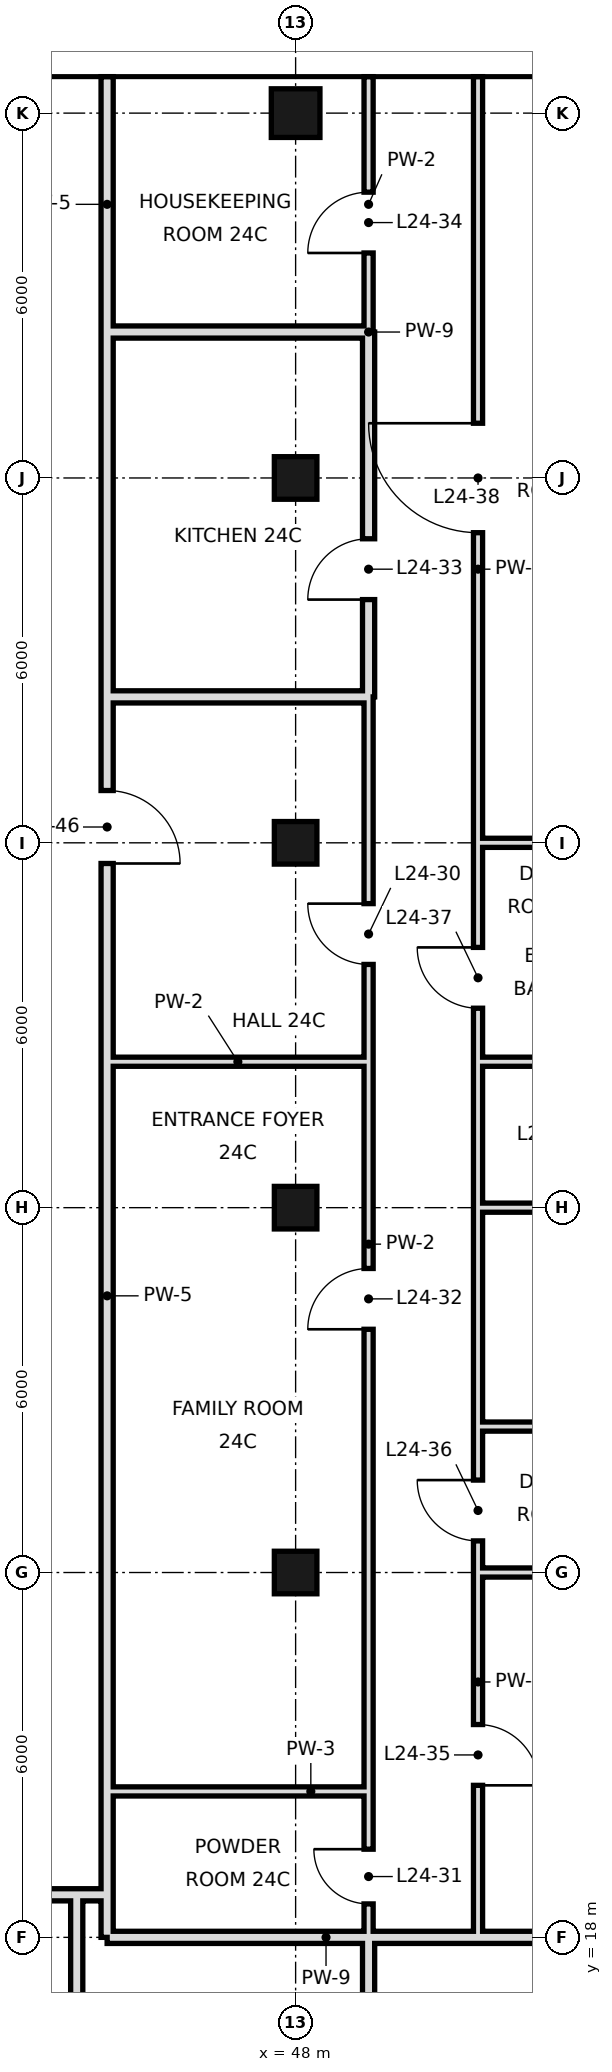
"""IFC4 building model, lengths in metres.
Left out: names, types, materials, properties, quantities, classifications, styles, units other than length and angle.
Written with IfcOpenShell. Run it as: python <this file> out.ifc"""

import sys

from ifc_helpers import new_model, si_unit, direction, frame, frame_2d, origin, origin_2d, place, context, subcontext, project, spatial, rectangle, hollow_rectangle, extrude, element, fill, save


model = new_model("IFC4")
c1 = context("Model", 3, precision=1e-05, world=origin(), true_north=direction((0.0, 1.0)))
c2 = subcontext(c1, "Body", "Model", "MODEL_VIEW")
j1 = project(units=[si_unit("LENGTHUNIT", "METRE"), si_unit("PLANEANGLEUNIT", "RADIAN")], contexts=[c1])
p1 = place(None, origin())
s1 = spatial("IfcSite", under=j1, at=p1, CompositionType="ELEMENT")
p2 = place(p1, origin())
s2 = spatial("IfcBuilding", under=s1, at=p2, CompositionType="ELEMENT")
p3 = place(p2, frame((0.0, 0.0, 110.6)))
s3 = spatial("IfcBuildingStorey", under=s2, at=p3, CompositionType="ELEMENT", Elevation=110.6)
for number, where, z_axis, x_axis in (
    (1, (48.0, 24.0, 0.0), (0.0, 0.0, 1.0), (1.0, 0.0, 0.0)),
    (2, (48.0, 30.0, 0.0), (0.0, 0.0, 1.0), (1.0, 0.0, 0.0)),
    (3, (48.0, 36.0, 0.0), (0.0, 0.0, 1.0), (1.0, 0.0, 0.0)),
    (4, (48.0, 42.0, 0.0), (0.0, 0.0, 1.0), (1.0, 0.0, 0.0)),
):
    element("IfcColumn", number, at=place(p3, frame(where, z_axis=z_axis, x_axis=x_axis)), inside=s3, PredefinedType="COLUMN", context=c2, shape_type="SweptSolid", body=[
        extrude(hollow_rectangle(XDim=0.7, YDim=0.7, WallThickness=0.036, at=origin_2d()), origin(), (0.0, 0.0, 1.0), 3.6),
    ])
p4 = place(p3, frame((48.0, 48.0, 0.0), z_axis=(0.0, 0.0, 1.0), x_axis=(1.0, 0.0, 0.0)))
e5 = element("IfcColumn", 5, at=p4, inside=s3, PredefinedType="COLUMN", context=c2, shape_type="SweptSolid", body=[
    extrude(hollow_rectangle(XDim=0.8, YDim=0.8, WallThickness=0.04, at=origin_2d()), origin(), (0.0, 0.0, 1.0), 3.6),
])
p5 = place(p3, frame((44.4, 10.8, 0.0), z_axis=(0.0, 0.0, 1.0), x_axis=(0.0, 1.0, 0.0)))
e6 = element("IfcWall", 6, at=p5, inside=s3, PredefinedType="SOLIDWALL", context=c2, shape_type="SweptSolid", body=[
    extrude(rectangle(XDim=7.9, YDim=0.2, at=frame_2d((3.95, 0.0))), origin(), (0.0, 0.0, 1.0), 2.68),
])
p6 = place(p3, frame((44.9, 18.7, 0.0), z_axis=(0.0, 0.0, 1.0), x_axis=(0.0, 1.0, 0.0)))
e7 = element("IfcWall", 7, at=p6, inside=s3, PredefinedType="SOLIDWALL", context=c2, shape_type="SweptSolid", body=[
    extrude(rectangle(XDim=19.7, YDim=0.2, at=frame_2d((9.85, 0.0))), origin(), (0.0, 0.0, 1.0), 2.93),
])
p7 = place(p6, frame((16.96, 0.0, 0.0)))
e8 = element("IfcOpeningElement", 8, at=p7, cuts=e7, PredefinedType="OPENING", context=c2, shape_type="SweptSolid", body=[
    extrude(rectangle(XDim=1.2, YDim=2.4, at=frame_2d((0.6, 1.2))), frame((0.0, 0.11, 0.0), z_axis=(0.0, -1.0, 0.0), x_axis=(1.0, 0.0, 0.0)), (0.0, 0.0, 1.0), 0.22),
])
p8 = place(p3, frame((44.9, 44.4, 0.0), z_axis=(0.0, 0.0, 1.0), x_axis=(0.0, 1.0, 0.0)))
e9 = element("IfcWall", 9, at=p8, inside=s3, PredefinedType="SOLIDWALL", context=c2, shape_type="SweptSolid", body=[
    extrude(rectangle(XDim=4.2, YDim=0.2, at=frame_2d((2.1, 0.0))), origin(), (0.0, 0.0, 1.0), 2.68),
])
p9 = place(p3, frame((44.9, 18.0, 0.0), z_axis=(0.0, 0.0, 1.0), x_axis=(0.0, 1.0, 0.0)))
e10 = element("IfcWall", 10, at=p9, inside=s3, PredefinedType="SOLIDWALL", context=c2, shape_type="SweptSolid", body=[
    extrude(rectangle(XDim=0.7, YDim=0.2, at=frame_2d((0.35, 0.0))), origin(), (0.0, 0.0, 1.0), 2.93),
])
p10 = place(p3, frame((44.9, 38.4, 0.0), z_axis=(0.0, 0.0, 1.0), x_axis=(0.0, 1.0, 0.0)))
e11 = element("IfcWall", 11, at=p10, inside=s3, PredefinedType="SOLIDWALL", context=c2, shape_type="SweptSolid", body=[
    extrude(rectangle(XDim=6.0, YDim=0.2, at=frame_2d((3.0, 0.0))), origin(), (0.0, 0.0, 1.0), 2.93),
])
p11 = place(p3, frame((49.2, 10.8, 0.0), z_axis=(0.0, 0.0, 1.0), x_axis=(0.0, 1.0, 0.0)))
e12 = element("IfcWall", 12, at=p11, inside=s3, PredefinedType="SOLIDWALL", context=c2, shape_type="SweptSolid", body=[
    extrude(rectangle(XDim=7.2, YDim=0.2, at=frame_2d((3.6, 0.0))), origin(), (0.0, 0.0, 1.0), 2.68),
])
p12 = place(p3, frame((49.2, 38.4, 0.0), z_axis=(0.0, 0.0, 1.0), x_axis=(0.0, 1.0, 0.0)))
e13 = element("IfcWall", 13, at=p12, inside=s3, PredefinedType="SOLIDWALL", context=c2, shape_type="SweptSolid", body=[
    extrude(rectangle(XDim=6.0, YDim=0.2, at=frame_2d((3.0, 0.0))), origin(), (0.0, 0.0, 1.0), 2.68),
])
p13 = place(p12, frame((1.6, 0.0, 0.0)))
e14 = element("IfcOpeningElement", 14, at=p13, cuts=e13, PredefinedType="OPENING", context=c2, shape_type="SweptSolid", body=[
    extrude(rectangle(XDim=1.0, YDim=2.4, at=frame_2d((0.5, 1.2))), frame((0.0, 0.11, 0.0), z_axis=(0.0, -1.0, 0.0), x_axis=(1.0, 0.0, 0.0)), (0.0, 0.0, 1.0), 0.22),
])
p14 = place(p3, frame((49.2, 20.4, 0.0), z_axis=(0.0, 0.0, 1.0), x_axis=(0.0, 1.0, 0.0)))
e15 = element("IfcWall", 15, at=p14, inside=s3, PredefinedType="PARTITIONING", context=c2, shape_type="SweptSolid", body=[
    extrude(rectangle(XDim=18.0, YDim=0.15, at=frame_2d((9.0, 0.0))), origin(), (0.0, 0.0, 1.0), 3.38),
])
p15 = place(p14, frame((13.6, 0.0, 0.0)))
e16 = element("IfcOpeningElement", 16, at=p15, cuts=e15, PredefinedType="OPENING", context=c2, shape_type="SweptSolid", body=[
    extrude(rectangle(XDim=1.0, YDim=2.4, at=frame_2d((0.5, 1.2))), frame((0.0, 0.085, 0.0), z_axis=(0.0, -1.0, 0.0), x_axis=(1.0, 0.0, 0.0)), (0.0, 0.0, 1.0), 0.17),
])
p16 = place(p14, frame((7.6, 0.0, 0.0)))
e17 = element("IfcOpeningElement", 17, at=p16, cuts=e15, PredefinedType="OPENING", context=c2, shape_type="SweptSolid", body=[
    extrude(rectangle(XDim=1.0, YDim=2.4, at=frame_2d((0.5, 1.2))), frame((0.0, 0.085, 0.0), z_axis=(0.0, -1.0, 0.0), x_axis=(1.0, 0.0, 0.0)), (0.0, 0.0, 1.0), 0.17),
])
p17 = place(p3, frame((49.2, 44.4, 0.0), z_axis=(0.0, 0.0, 1.0), x_axis=(0.0, 1.0, 0.0)))
e18 = element("IfcWall", 18, at=p17, inside=s3, PredefinedType="PARTITIONING", context=c2, shape_type="SweptSolid", body=[
    extrude(rectangle(XDim=4.2, YDim=0.15, at=frame_2d((2.1, 0.0))), origin(), (0.0, 0.0, 1.0), 3.38),
])
p18 = place(p17, frame((1.3, 0.0, 0.0)))
e19 = element("IfcOpeningElement", 19, at=p18, cuts=e18, PredefinedType="OPENING", context=c2, shape_type="SweptSolid", body=[
    extrude(rectangle(XDim=1.0, YDim=2.4, at=frame_2d((0.5, 1.2))), frame((0.0, 0.085, 0.0), z_axis=(0.0, -1.0, 0.0), x_axis=(1.0, 0.0, 0.0)), (0.0, 0.0, 1.0), 0.17),
])
p19 = place(p3, frame((49.2, 18.0, 0.0), z_axis=(0.0, 0.0, 1.0), x_axis=(0.0, 1.0, 0.0)))
e20 = element("IfcWall", 20, at=p19, inside=s3, PredefinedType="PARTITIONING", context=c2, shape_type="SweptSolid", body=[
    extrude(rectangle(XDim=2.4, YDim=0.15, at=frame_2d((1.2, 0.0))), origin(), (0.0, 0.0, 1.0), 3.38),
])
p20 = place(p19, frame((0.55, 0.0, 0.0)))
e21 = element("IfcOpeningElement", 21, at=p20, cuts=e20, PredefinedType="OPENING", context=c2, shape_type="SweptSolid", body=[
    extrude(rectangle(XDim=0.9, YDim=2.4, at=frame_2d((0.45, 1.2))), frame((0.0, 0.085, 0.0), z_axis=(0.0, -1.0, 0.0), x_axis=(1.0, 0.0, 0.0)), (0.0, 0.0, 1.0), 0.17),
])
p21 = place(p3, frame((51.0, 18.0, 0.0), z_axis=(0.0, 0.0, 1.0), x_axis=(0.0, 1.0, 0.0)))
e22 = element("IfcWall", 22, at=p21, inside=s3, PredefinedType="PARTITIONING", context=c2, shape_type="SweptSolid", body=[
    extrude(rectangle(XDim=8.4, YDim=0.15, at=frame_2d((4.2, 0.0))), origin(), (0.0, 0.0, 1.0), 3.38),
])
p22 = place(p21, frame((2.5, 0.0, 0.0)))
e23 = element("IfcOpeningElement", 23, at=p22, cuts=e22, PredefinedType="OPENING", context=c2, shape_type="SweptSolid", body=[
    extrude(rectangle(XDim=1.0, YDim=2.4, at=frame_2d((0.5, 1.2))), frame((0.0, 0.085, 0.0), z_axis=(0.0, -1.0, 0.0), x_axis=(1.0, 0.0, 0.0)), (0.0, 0.0, 1.0), 0.17),
])
p23 = place(p21, frame((6.52, 0.0, 0.0)))
e24 = element("IfcOpeningElement", 24, at=p23, cuts=e22, PredefinedType="OPENING", context=c2, shape_type="SweptSolid", body=[
    extrude(rectangle(XDim=1.0, YDim=2.4, at=frame_2d((0.5, 1.2))), frame((0.0, 0.085, 0.0), z_axis=(0.0, -1.0, 0.0), x_axis=(1.0, 0.0, 0.0)), (0.0, 0.0, 1.0), 0.17),
])
p24 = place(p3, frame((51.0, 32.4, 0.0), z_axis=(0.0, 0.0, 1.0), x_axis=(0.0, 1.0, 0.0)))
e25 = element("IfcWall", 25, at=p24, inside=s3, PredefinedType="PARTITIONING", context=c2, shape_type="SweptSolid", body=[
    extrude(rectangle(XDim=16.2, YDim=0.15, at=frame_2d((8.1, 0.0))), origin(), (0.0, 0.0, 1.0), 3.38),
])
p25 = place(p24, frame((0.88, 0.0, 0.0)))
e26 = element("IfcOpeningElement", 26, at=p25, cuts=e25, PredefinedType="OPENING", context=c2, shape_type="SweptSolid", body=[
    extrude(rectangle(XDim=1.0, YDim=2.4, at=frame_2d((0.5, 1.2))), frame((0.0, 0.085, 0.0), z_axis=(0.0, -1.0, 0.0), x_axis=(1.0, 0.0, 0.0)), (0.0, 0.0, 1.0), 0.17),
])
p26 = place(p24, frame((8.7, 0.0, 0.0)))
e27 = element("IfcOpeningElement", 27, at=p26, cuts=e25, PredefinedType="OPENING", context=c2, shape_type="SweptSolid", body=[
    extrude(rectangle(XDim=1.8, YDim=2.4, at=frame_2d((0.9, 1.2))), frame((0.0, 0.085, 0.0), z_axis=(0.0, -1.0, 0.0), x_axis=(1.0, 0.0, 0.0)), (0.0, 0.0, 1.0), 0.17),
])
p27 = place(p3, frame((51.0, 26.4, 0.0), z_axis=(0.0, 0.0, 1.0), x_axis=(0.0, 1.0, 0.0)))
e28 = element("IfcWall", 28, at=p27, inside=s3, PredefinedType="PARTITIONING", context=c2, shape_type="SweptSolid", body=[
    extrude(rectangle(XDim=6.0, YDim=0.15, at=frame_2d((3.0, 0.0))), origin(), (0.0, 0.0, 1.0), 3.38),
])
p28 = place(p3, frame((44.9, 18.0, 0.0), z_axis=(0.0, 0.0, 1.0), x_axis=(1.0, 0.0, 0.0)))
e29 = element("IfcWall", 29, at=p28, inside=s3, PredefinedType="SOLIDWALL", context=c2, shape_type="SweptSolid", body=[
    extrude(rectangle(XDim=4.3, YDim=0.2, at=frame_2d((2.15, 0.0))), origin(), (0.0, 0.0, 1.0), 2.68),
])
p29 = place(p3, frame((49.2, 18.0, 0.0), z_axis=(0.0, 0.0, 1.0), x_axis=(1.0, 0.0, 0.0)))
e30 = element("IfcWall", 30, at=p29, inside=s3, PredefinedType="SOLIDWALL", context=c2, shape_type="SweptSolid", body=[
    extrude(rectangle(XDim=11.4, YDim=0.2, at=frame_2d((5.7, 0.0))), origin(), (0.0, 0.0, 1.0), 2.68),
])
p30 = place(p3, frame((21.6, 18.7, 0.0), z_axis=(0.0, 0.0, 1.0), x_axis=(1.0, 0.0, 0.0)))
e31 = element("IfcWall", 31, at=p30, inside=s3, PredefinedType="SOLIDWALL", context=c2, shape_type="SweptSolid", body=[
    extrude(rectangle(XDim=22.8, YDim=0.2, at=frame_2d((11.4, 0.0))), origin(), (0.0, 0.0, 1.0), 2.68),
])
p31 = place(p30, frame((4.8, 0.0, 0.0)))
e32 = element("IfcOpeningElement", 32, at=p31, cuts=e31, PredefinedType="OPENING", context=c2, shape_type="SweptSolid", body=[
    extrude(rectangle(XDim=1.2, YDim=2.4, at=frame_2d((0.6, 1.2))), frame((0.0, 0.11, 0.0), z_axis=(0.0, -1.0, 0.0), x_axis=(1.0, 0.0, 0.0)), (0.0, 0.0, 1.0), 0.22),
])
p32 = place(p30, frame((16.8, 0.0, 0.0)))
e33 = element("IfcOpeningElement", 33, at=p32, cuts=e31, PredefinedType="OPENING", context=c2, shape_type="SweptSolid", body=[
    extrude(rectangle(XDim=1.2, YDim=2.4, at=frame_2d((0.6, 1.2))), frame((0.0, 0.11, 0.0), z_axis=(0.0, -1.0, 0.0), x_axis=(1.0, 0.0, 0.0)), (0.0, 0.0, 1.0), 0.22),
])
p33 = place(p3, frame((44.4, 18.7, 0.0), z_axis=(0.0, 0.0, 1.0), x_axis=(1.0, 0.0, 0.0)))
e34 = element("IfcWall", 34, at=p33, inside=s3, PredefinedType="SOLIDWALL", context=c2, shape_type="SweptSolid", body=[
    extrude(rectangle(XDim=0.5, YDim=0.2, at=frame_2d((0.25, 0.0))), origin(), (0.0, 0.0, 1.0), 3.38),
])
p34 = place(p3, frame((44.9, 20.4, 0.0), z_axis=(0.0, 0.0, 1.0), x_axis=(1.0, 0.0, 0.0)))
e35 = element("IfcWall", 35, at=p34, inside=s3, PredefinedType="PARTITIONING", context=c2, shape_type="SweptSolid", body=[
    extrude(rectangle(XDim=4.3, YDim=0.15, at=frame_2d((2.15, 0.0))), origin(), (0.0, 0.0, 1.0), 3.38),
])
p35 = place(p3, frame((51.0, 24.0, 0.0), z_axis=(0.0, 0.0, 1.0), x_axis=(1.0, 0.0, 0.0)))
e36 = element("IfcWall", 36, at=p35, inside=s3, PredefinedType="PARTITIONING", context=c2, shape_type="SweptSolid", body=[
    extrude(rectangle(XDim=9.0, YDim=0.15, at=frame_2d((4.5, 0.0))), origin(), (0.0, 0.0, 1.0), 2.68),
])
p36 = place(p3, frame((51.0, 26.4, 0.0), z_axis=(0.0, 0.0, 1.0), x_axis=(1.0, 0.0, 0.0)))
e37 = element("IfcWall", 37, at=p36, inside=s3, PredefinedType="PARTITIONING", context=c2, shape_type="SweptSolid", body=[
    extrude(rectangle(XDim=3.0, YDim=0.15, at=frame_2d((1.5, 0.0))), origin(), (0.0, 0.0, 1.0), 3.38),
])
p37 = place(p3, frame((51.0, 30.0, 0.0), z_axis=(0.0, 0.0, 1.0), x_axis=(1.0, 0.0, 0.0)))
e38 = element("IfcWall", 38, at=p37, inside=s3, PredefinedType="PARTITIONING", context=c2, shape_type="SweptSolid", body=[
    extrude(rectangle(XDim=3.0, YDim=0.15, at=frame_2d((1.5, 0.0))), origin(), (0.0, 0.0, 1.0), 2.68),
])
p38 = place(p3, frame((44.9, 32.4, 0.0), z_axis=(0.0, 0.0, 1.0), x_axis=(1.0, 0.0, 0.0)))
e39 = element("IfcWall", 39, at=p38, inside=s3, PredefinedType="PARTITIONING", context=c2, shape_type="SweptSolid", body=[
    extrude(rectangle(XDim=4.3, YDim=0.15, at=frame_2d((2.15, 0.0))), origin(), (0.0, 0.0, 1.0), 3.38),
])
p39 = place(p3, frame((51.0, 32.4, 0.0), z_axis=(0.0, 0.0, 1.0), x_axis=(1.0, 0.0, 0.0)))
e40 = element("IfcWall", 40, at=p39, inside=s3, PredefinedType="PARTITIONING", context=c2, shape_type="SweptSolid", body=[
    extrude(rectangle(XDim=3.0, YDim=0.15, at=frame_2d((1.5, 0.0))), origin(), (0.0, 0.0, 1.0), 3.38),
])
p40 = place(p3, frame((51.0, 36.0, 0.0), z_axis=(0.0, 0.0, 1.0), x_axis=(1.0, 0.0, 0.0)))
e41 = element("IfcWall", 41, at=p40, inside=s3, PredefinedType="PARTITIONING", context=c2, shape_type="SweptSolid", body=[
    extrude(rectangle(XDim=9.0, YDim=0.15, at=frame_2d((4.5, 0.0))), origin(), (0.0, 0.0, 1.0), 2.68),
])
for number, where, z_axis, x_axis in (
    (42, (44.9, 38.4, 0.0), (0.0, 0.0, 1.0), (1.0, 0.0, 0.0)),
    (43, (44.9, 44.4, 0.0), (0.0, 0.0, 1.0), (1.0, 0.0, 0.0)),
):
    element("IfcWall", number, at=place(p3, frame(where, z_axis=z_axis, x_axis=x_axis)), inside=s3, PredefinedType="SOLIDWALL", context=c2, shape_type="SweptSolid", body=[
        extrude(rectangle(XDim=4.3, YDim=0.2, at=frame_2d((2.15, 0.0))), origin(), (0.0, 0.0, 1.0), 2.93),
    ])
p41 = place(p15, frame((1.0, 0.0, 0.0), z_axis=(0.0, 0.0, 1.0), x_axis=(-1.0, 0.0, 0.0)))
e44 = element("IfcDoor", 44, at=p41, inside=s3, OperationType="SINGLE_SWING_LEFT", PredefinedType="DOOR", context=c2, shape_type="SweptSolid", body=[
    extrude(rectangle(XDim=1.0, YDim=2.4, at=frame_2d((0.5, 1.2))), frame((0.0, 0.025, 0.0), z_axis=(0.0, -1.0, 0.0), x_axis=(1.0, 0.0, 0.0)), (0.0, 0.0, 1.0), 0.05),
])
fill(e16, e44)
p42 = place(p20, frame((0.9, 0.0, 0.0), z_axis=(0.0, 0.0, 1.0), x_axis=(-1.0, 0.0, 0.0)))
e45 = element("IfcDoor", 45, at=p42, inside=s3, OperationType="SINGLE_SWING_LEFT", PredefinedType="DOOR", context=c2, shape_type="SweptSolid", body=[
    extrude(rectangle(XDim=0.9, YDim=2.4, at=frame_2d((0.45, 1.2))), frame((0.0, 0.025, 0.0), z_axis=(0.0, -1.0, 0.0), x_axis=(1.0, 0.0, 0.0)), (0.0, 0.0, 1.0), 0.05),
])
fill(e21, e45)
p43 = place(p16, origin())
e46 = element("IfcDoor", 46, at=p43, inside=s3, OperationType="SINGLE_SWING_LEFT", PredefinedType="DOOR", context=c2, shape_type="SweptSolid", body=[
    extrude(rectangle(XDim=1.0, YDim=2.4, at=frame_2d((0.5, 1.2))), frame((0.0, 0.025, 0.0), z_axis=(0.0, -1.0, 0.0), x_axis=(1.0, 0.0, 0.0)), (0.0, 0.0, 1.0), 0.05),
])
fill(e17, e46)
p44 = place(p13, origin())
e47 = element("IfcDoor", 47, at=p44, inside=s3, OperationType="SINGLE_SWING_LEFT", PredefinedType="DOOR", context=c2, shape_type="SweptSolid", body=[
    extrude(rectangle(XDim=1.0, YDim=2.4, at=frame_2d((0.5, 1.2))), frame((0.0, 0.025, 0.0), z_axis=(0.0, -1.0, 0.0), x_axis=(1.0, 0.0, 0.0)), (0.0, 0.0, 1.0), 0.05),
])
fill(e14, e47)
p45 = place(p18, origin())
e48 = element("IfcDoor", 48, at=p45, inside=s3, OperationType="SINGLE_SWING_LEFT", PredefinedType="DOOR", context=c2, shape_type="SweptSolid", body=[
    extrude(rectangle(XDim=1.0, YDim=2.4, at=frame_2d((0.5, 1.2))), frame((0.0, 0.025, 0.0), z_axis=(0.0, -1.0, 0.0), x_axis=(1.0, 0.0, 0.0)), (0.0, 0.0, 1.0), 0.05),
])
fill(e19, e48)
p46 = place(p22, frame((1.0, 0.0, 0.0), z_axis=(0.0, 0.0, 1.0), x_axis=(-1.0, 0.0, 0.0)))
e49 = element("IfcDoor", 49, at=p46, inside=s3, OperationType="SINGLE_SWING_RIGHT", PredefinedType="DOOR", context=c2, shape_type="SweptSolid", body=[
    extrude(rectangle(XDim=1.0, YDim=2.4, at=frame_2d((0.5, 1.2))), frame((0.0, 0.025, 0.0), z_axis=(0.0, -1.0, 0.0), x_axis=(1.0, 0.0, 0.0)), (0.0, 0.0, 1.0), 0.05),
])
fill(e23, e49)
p47 = place(p23, frame((1.0, 0.0, 0.0), z_axis=(0.0, 0.0, 1.0), x_axis=(-1.0, 0.0, 0.0)))
e50 = element("IfcDoor", 50, at=p47, inside=s3, OperationType="SINGLE_SWING_LEFT", PredefinedType="DOOR", context=c2, shape_type="SweptSolid", body=[
    extrude(rectangle(XDim=1.0, YDim=2.4, at=frame_2d((0.5, 1.2))), frame((0.0, 0.025, 0.0), z_axis=(0.0, -1.0, 0.0), x_axis=(1.0, 0.0, 0.0)), (0.0, 0.0, 1.0), 0.05),
])
fill(e24, e50)
p48 = place(p25, frame((1.0, 0.0, 0.0), z_axis=(0.0, 0.0, 1.0), x_axis=(-1.0, 0.0, 0.0)))
e51 = element("IfcDoor", 51, at=p48, inside=s3, OperationType="SINGLE_SWING_LEFT", PredefinedType="DOOR", context=c2, shape_type="SweptSolid", body=[
    extrude(rectangle(XDim=1.0, YDim=2.4, at=frame_2d((0.5, 1.2))), frame((0.0, 0.025, 0.0), z_axis=(0.0, -1.0, 0.0), x_axis=(1.0, 0.0, 0.0)), (0.0, 0.0, 1.0), 0.05),
])
fill(e26, e51)
p49 = place(p26, frame((1.8, 0.0, 0.0), z_axis=(0.0, 0.0, 1.0), x_axis=(-1.0, 0.0, 0.0)))
e52 = element("IfcDoor", 52, at=p49, inside=s3, OperationType="SINGLE_SWING_LEFT", PredefinedType="DOOR", context=c2, shape_type="SweptSolid", body=[
    extrude(rectangle(XDim=1.8, YDim=2.4, at=frame_2d((0.9, 1.2))), frame((0.0, 0.025, 0.0), z_axis=(0.0, -1.0, 0.0), x_axis=(1.0, 0.0, 0.0)), (0.0, 0.0, 1.0), 0.05),
])
fill(e27, e52)
p50 = place(p7, frame((1.2, 0.0, 0.0), z_axis=(0.0, 0.0, 1.0), x_axis=(-1.0, 0.0, 0.0)))
e53 = element("IfcDoor", 53, at=p50, inside=s3, OperationType="SINGLE_SWING_RIGHT", PredefinedType="DOOR", context=c2, shape_type="SweptSolid", body=[
    extrude(rectangle(XDim=1.2, YDim=2.4, at=frame_2d((0.6, 1.2))), frame((0.0, 0.025, 0.0), z_axis=(0.0, -1.0, 0.0), x_axis=(1.0, 0.0, 0.0)), (0.0, 0.0, 1.0), 0.05),
])
fill(e8, e53)
save(model, sys.argv[1])
